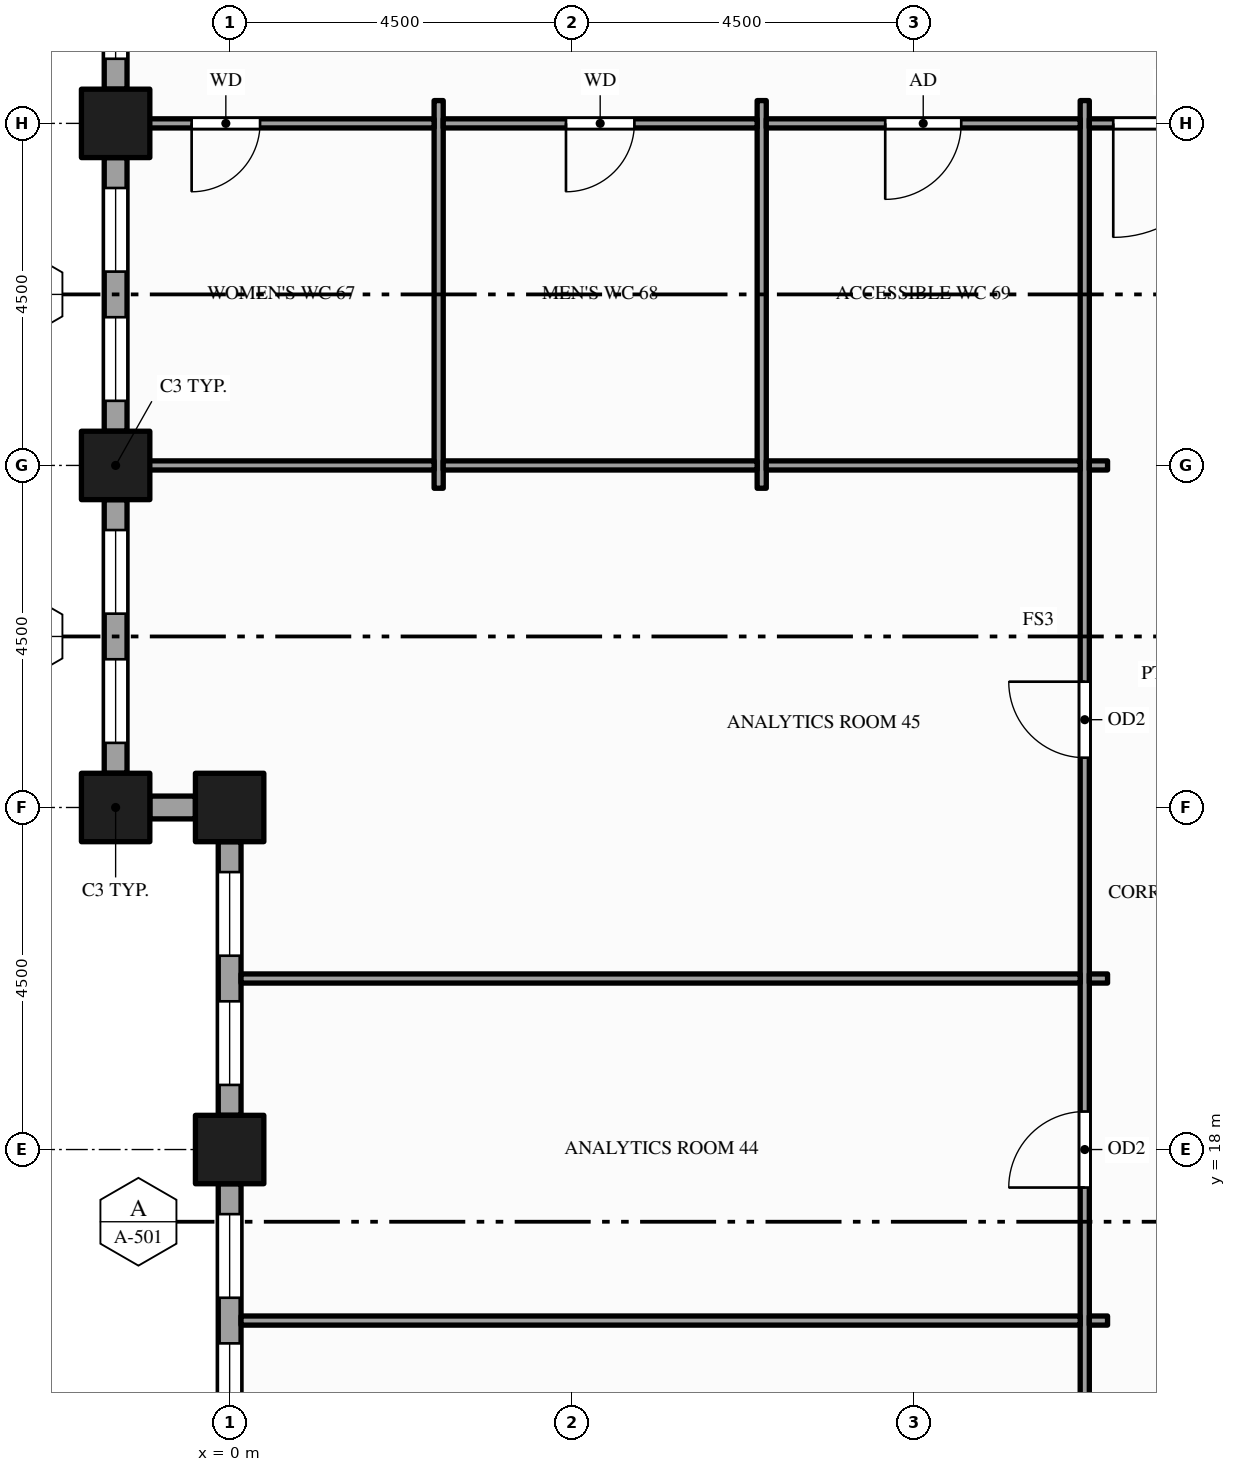
"""IFC4 building model, lengths in metres.
Left out: names, types, materials, properties, quantities, classifications, styles, units other than length and angle.
Written with IfcOpenShell. Run it as: python <this file> out.ifc"""

import sys

from ifc_helpers import new_model, si_unit, direction, frame, frame_2d, origin, origin_2d, place, context, subcontext, project, spatial, rectangle, hollow_rectangle, extrude, element, fill, save


model = new_model("IFC4")
c1 = context("Model", 3, precision=1e-05, world=origin(), true_north=direction((0.0, 1.0)))
c2 = subcontext(c1, "Body", "Model", "MODEL_VIEW")
j1 = project(units=[si_unit("LENGTHUNIT", "METRE"), si_unit("PLANEANGLEUNIT", "RADIAN")], contexts=[c1])
p1 = place(None, origin())
s1 = spatial("IfcSite", under=j1, at=p1, CompositionType="ELEMENT")
p2 = place(p1, origin())
s2 = spatial("IfcBuilding", under=s1, at=p2, CompositionType="ELEMENT")
p3 = place(p2, frame((0.0, 0.0, 183.0)))
s3 = spatial("IfcBuildingStorey", under=s2, at=p3, CompositionType="ELEMENT", Elevation=183.0)
for number, where, z_axis, x_axis in (
    (1, (-1.5, 22.5, -0.15), (0.0, 0.0, 1.0), (1.0, 0.0, 0.0)),
    (2, (-1.5, 27.0, -0.15), (0.0, 0.0, 1.0), (1.0, 0.0, 0.0)),
    (3, (-1.5, 31.5, -0.15), (0.0, 0.0, 1.0), (1.0, 0.0, 0.0)),
    (4, (0.0, 18.0, -0.15), (0.0, 0.0, 1.0), (1.0, 0.0, 0.0)),
    (5, (0.0, 22.5, -0.15), (0.0, 0.0, 1.0), (1.0, 0.0, 0.0)),
):
    element("IfcColumn", number, at=place(p3, frame(where, z_axis=z_axis, x_axis=x_axis)), inside=s3, PredefinedType="COLUMN", context=c2, shape_type="SweptSolid", body=[
        extrude(hollow_rectangle(XDim=0.9, YDim=0.9, WallThickness=0.045, at=origin_2d()), origin(), (0.0, 0.0, 1.0), 3.9),
    ])
p4 = place(p3, frame((-1.5, 35.55, 0.0), z_axis=(0.0, 0.0, 1.0), x_axis=(0.0, -1.0, 0.0)))
e6 = element("IfcWall", 6, at=p4, inside=s3, PredefinedType="STANDARD", context=c2, shape_type="SweptSolid", body=[
    extrude(rectangle(XDim=3.6, YDim=0.3, at=frame_2d((1.8, 0.0))), origin(), (0.0, 0.0, 1.0), 3.049),
])
p5 = place(p4, frame((0.4, 0.0, 0.9)))
e7 = element("IfcOpeningElement", 7, at=p5, cuts=e6, PredefinedType="OPENING", context=c2, shape_type="SweptSolid", body=[
    extrude(rectangle(XDim=1.1, YDim=2.0, at=frame_2d((0.55, 1.0))), frame((0.0, 0.16, 0.0), z_axis=(0.0, -1.0, 0.0), x_axis=(1.0, 0.0, 0.0)), (0.0, 0.0, 1.0), 0.32),
])
p6 = place(p4, frame((2.1, 0.0, 0.9)))
e8 = element("IfcOpeningElement", 8, at=p6, cuts=e6, PredefinedType="OPENING", context=c2, shape_type="SweptSolid", body=[
    extrude(rectangle(XDim=1.1, YDim=2.0, at=frame_2d((0.55, 1.0))), frame((0.0, 0.16, 0.0), z_axis=(0.0, -1.0, 0.0), x_axis=(1.0, 0.0, 0.0)), (0.0, 0.0, 1.0), 0.32),
])
p7 = place(p3, frame((-1.5, 31.05, 0.0), z_axis=(0.0, 0.0, 1.0), x_axis=(0.0, -1.0, 0.0)))
e9 = element("IfcWall", 9, at=p7, inside=s3, PredefinedType="STANDARD", context=c2, shape_type="SweptSolid", body=[
    extrude(rectangle(XDim=3.6, YDim=0.3, at=frame_2d((1.8, 0.0))), origin(), (0.0, 0.0, 1.0), 3.049),
])
p8 = place(p7, frame((0.4, 0.0, 0.9)))
e10 = element("IfcOpeningElement", 10, at=p8, cuts=e9, PredefinedType="OPENING", context=c2, shape_type="SweptSolid", body=[
    extrude(rectangle(XDim=1.1, YDim=2.0, at=frame_2d((0.55, 1.0))), frame((0.0, 0.16, 0.0), z_axis=(0.0, -1.0, 0.0), x_axis=(1.0, 0.0, 0.0)), (0.0, 0.0, 1.0), 0.32),
])
p9 = place(p7, frame((2.1, 0.0, 0.9)))
e11 = element("IfcOpeningElement", 11, at=p9, cuts=e9, PredefinedType="OPENING", context=c2, shape_type="SweptSolid", body=[
    extrude(rectangle(XDim=1.1, YDim=2.0, at=frame_2d((0.55, 1.0))), frame((0.0, 0.16, 0.0), z_axis=(0.0, -1.0, 0.0), x_axis=(1.0, 0.0, 0.0)), (0.0, 0.0, 1.0), 0.32),
])
p10 = place(p3, frame((-1.5, 26.55, 0.0), z_axis=(0.0, 0.0, 1.0), x_axis=(0.0, -1.0, 0.0)))
e12 = element("IfcWall", 12, at=p10, inside=s3, PredefinedType="STANDARD", context=c2, shape_type="SweptSolid", body=[
    extrude(rectangle(XDim=3.6, YDim=0.3, at=frame_2d((1.8, 0.0))), origin(), (0.0, 0.0, 1.0), 3.049),
])
p11 = place(p10, frame((0.4, 0.0, 0.9)))
e13 = element("IfcOpeningElement", 13, at=p11, cuts=e12, PredefinedType="OPENING", context=c2, shape_type="SweptSolid", body=[
    extrude(rectangle(XDim=1.1, YDim=2.0, at=frame_2d((0.55, 1.0))), frame((0.0, 0.16, 0.0), z_axis=(0.0, -1.0, 0.0), x_axis=(1.0, 0.0, 0.0)), (0.0, 0.0, 1.0), 0.32),
])
p12 = place(p10, frame((2.1, 0.0, 0.9)))
e14 = element("IfcOpeningElement", 14, at=p12, cuts=e12, PredefinedType="OPENING", context=c2, shape_type="SweptSolid", body=[
    extrude(rectangle(XDim=1.1, YDim=2.0, at=frame_2d((0.55, 1.0))), frame((0.0, 0.16, 0.0), z_axis=(0.0, -1.0, 0.0), x_axis=(1.0, 0.0, 0.0)), (0.0, 0.0, 1.0), 0.32),
])
p13 = place(p3, frame((-1.05, 22.5, 0.0), z_axis=(0.0, 0.0, 1.0), x_axis=(1.0, 0.0, 0.0)))
e15 = element("IfcWall", 15, at=p13, inside=s3, PredefinedType="STANDARD", context=c2, shape_type="SweptSolid", body=[
    extrude(rectangle(XDim=0.6, YDim=0.3, at=frame_2d((0.3, 0.0))), origin(), (0.0, 0.0, 1.0), 3.049),
])
p14 = place(p3, frame((0.0, 22.05, 0.0), z_axis=(0.0, 0.0, 1.0), x_axis=(0.0, -1.0, 0.0)))
e16 = element("IfcWall", 16, at=p14, inside=s3, PredefinedType="STANDARD", context=c2, shape_type="SweptSolid", body=[
    extrude(rectangle(XDim=3.6, YDim=0.3, at=frame_2d((1.8, 0.0))), origin(), (0.0, 0.0, 1.0), 3.049),
])
p15 = place(p14, frame((0.4, 0.0, 0.9)))
e17 = element("IfcOpeningElement", 17, at=p15, cuts=e16, PredefinedType="OPENING", context=c2, shape_type="SweptSolid", body=[
    extrude(rectangle(XDim=1.1, YDim=2.0, at=frame_2d((0.55, 1.0))), frame((0.0, 0.16, 0.0), z_axis=(0.0, -1.0, 0.0), x_axis=(1.0, 0.0, 0.0)), (0.0, 0.0, 1.0), 0.32),
])
p16 = place(p14, frame((2.1, 0.0, 0.9)))
e18 = element("IfcOpeningElement", 18, at=p16, cuts=e16, PredefinedType="OPENING", context=c2, shape_type="SweptSolid", body=[
    extrude(rectangle(XDim=1.1, YDim=2.0, at=frame_2d((0.55, 1.0))), frame((0.0, 0.16, 0.0), z_axis=(0.0, -1.0, 0.0), x_axis=(1.0, 0.0, 0.0)), (0.0, 0.0, 1.0), 0.32),
])
p17 = place(p3, frame((0.0, 17.55, 0.0), z_axis=(0.0, 0.0, 1.0), x_axis=(0.0, -1.0, 0.0)))
e19 = element("IfcWall", 19, at=p17, inside=s3, PredefinedType="STANDARD", context=c2, shape_type="SweptSolid", body=[
    extrude(rectangle(XDim=3.6, YDim=0.3, at=frame_2d((1.8, 0.0))), origin(), (0.0, 0.0, 1.0), 3.049),
])
p18 = place(p17, frame((0.4, 0.0, 0.9)))
e20 = element("IfcOpeningElement", 20, at=p18, cuts=e19, PredefinedType="OPENING", context=c2, shape_type="SweptSolid", body=[
    extrude(rectangle(XDim=1.1, YDim=2.0, at=frame_2d((0.55, 1.0))), frame((0.0, 0.16, 0.0), z_axis=(0.0, -1.0, 0.0), x_axis=(1.0, 0.0, 0.0)), (0.0, 0.0, 1.0), 0.32),
])
p19 = place(p17, frame((2.1, 0.0, 0.9)))
e21 = element("IfcOpeningElement", 21, at=p19, cuts=e19, PredefinedType="OPENING", context=c2, shape_type="SweptSolid", body=[
    extrude(rectangle(XDim=1.1, YDim=2.0, at=frame_2d((0.55, 1.0))), frame((0.0, 0.16, 0.0), z_axis=(0.0, -1.0, 0.0), x_axis=(1.0, 0.0, 0.0)), (0.0, 0.0, 1.0), 0.32),
])
for number, where, z_axis, x_axis in (
    (22, (2.75, 26.7, 0.0), (0.0, 0.0, 1.0), (0.0, 1.0, 0.0)),
    (23, (7.0, 26.7, 0.0), (0.0, 0.0, 1.0), (0.0, 1.0, 0.0)),
):
    element("IfcWall", number, at=place(p3, frame(where, z_axis=z_axis, x_axis=x_axis)), inside=s3, PredefinedType="PARTITIONING", context=c2, shape_type="SweptSolid", body=[
        extrude(rectangle(XDim=5.1, YDim=0.12, at=frame_2d((2.55, 0.0))), origin(), (0.0, 0.0, 1.0), 3.75),
    ])
p20 = place(p3, frame((11.25, 10.95, 0.0), z_axis=(0.0, 0.0, 1.0), x_axis=(0.0, 1.0, 0.0)))
e24 = element("IfcWall", 24, at=p20, inside=s3, PredefinedType="PARTITIONING", context=c2, shape_type="SweptSolid", body=[
    extrude(rectangle(XDim=20.85, YDim=0.12, at=frame_2d((10.425, 0.0))), origin(), (0.0, 0.0, 1.0), 2.5),
])
p21 = place(p20, frame((2.05, 0.0, 0.0)))
e25 = element("IfcOpeningElement", 25, at=p21, cuts=e24, PredefinedType="OPENING", context=c2, shape_type="SweptSolid", body=[
    extrude(rectangle(XDim=1.0, YDim=2.1, at=frame_2d((0.5, 1.05))), frame((0.0, 0.07, 0.0), z_axis=(0.0, -1.0, 0.0), x_axis=(1.0, 0.0, 0.0)), (0.0, 0.0, 1.0), 0.14),
])
p22 = place(p20, frame((6.55, 0.0, 0.0)))
e26 = element("IfcOpeningElement", 26, at=p22, cuts=e24, PredefinedType="OPENING", context=c2, shape_type="SweptSolid", body=[
    extrude(rectangle(XDim=1.0, YDim=2.1, at=frame_2d((0.5, 1.05))), frame((0.0, 0.07, 0.0), z_axis=(0.0, -1.0, 0.0), x_axis=(1.0, 0.0, 0.0)), (0.0, 0.0, 1.0), 0.14),
])
p23 = place(p20, frame((12.205, 0.0, 0.0)))
e27 = element("IfcOpeningElement", 27, at=p23, cuts=e24, PredefinedType="OPENING", context=c2, shape_type="SweptSolid", body=[
    extrude(rectangle(XDim=1.0, YDim=2.1, at=frame_2d((0.5, 1.05))), frame((0.0, 0.07, 0.0), z_axis=(0.0, -1.0, 0.0), x_axis=(1.0, 0.0, 0.0)), (0.0, 0.0, 1.0), 0.14),
])
p24 = place(p3, frame((0.15, 15.75, 0.0), z_axis=(0.0, 0.0, 1.0), x_axis=(1.0, 0.0, 0.0)))
e28 = element("IfcWall", 28, at=p24, inside=s3, PredefinedType="PARTITIONING", context=c2, shape_type="SweptSolid", body=[
    extrude(rectangle(XDim=11.04, YDim=0.12, at=frame_2d((5.52, 0.0))), origin(), (0.0, 0.0, 1.0), 2.77),
])
p25 = place(p3, frame((11.31, 15.75, 0.0), z_axis=(0.0, 0.0, 1.0), x_axis=(1.0, 0.0, 0.0)))
e29 = element("IfcWall", 29, at=p25, inside=s3, PredefinedType="PARTITIONING", context=c2, shape_type="SweptSolid", body=[
    extrude(rectangle(XDim=0.24, YDim=0.12, at=frame_2d((0.12, 0.0))), origin(), (0.0, 0.0, 1.0), 2.77),
])
p26 = place(p3, frame((0.15, 20.25, 0.0), z_axis=(0.0, 0.0, 1.0), x_axis=(1.0, 0.0, 0.0)))
e30 = element("IfcWall", 30, at=p26, inside=s3, PredefinedType="PARTITIONING", context=c2, shape_type="SweptSolid", body=[
    extrude(rectangle(XDim=11.04, YDim=0.12, at=frame_2d((5.52, 0.0))), origin(), (0.0, 0.0, 1.0), 2.77),
])
p27 = place(p3, frame((11.31, 20.25, 0.0), z_axis=(0.0, 0.0, 1.0), x_axis=(1.0, 0.0, 0.0)))
e31 = element("IfcWall", 31, at=p27, inside=s3, PredefinedType="PARTITIONING", context=c2, shape_type="SweptSolid", body=[
    extrude(rectangle(XDim=0.24, YDim=0.12, at=frame_2d((0.12, 0.0))), origin(), (0.0, 0.0, 1.0), 2.77),
])
p28 = place(p3, frame((-1.35, 27.0, 0.0), z_axis=(0.0, 0.0, 1.0), x_axis=(1.0, 0.0, 0.0)))
e32 = element("IfcWall", 32, at=p28, inside=s3, PredefinedType="PARTITIONING", context=c2, shape_type="SweptSolid", body=[
    extrude(rectangle(XDim=4.04, YDim=0.12, at=frame_2d((2.02, 0.0))), origin(), (0.0, 0.0, 1.0), 2.35),
])
for number, where, z_axis, x_axis in (
    (33, (2.81, 27.0, 0.0), (0.0, 0.0, 1.0), (1.0, 0.0, 0.0)),
    (34, (7.06, 27.0, 0.0), (0.0, 0.0, 1.0), (1.0, 0.0, 0.0)),
):
    element("IfcWall", number, at=place(p3, frame(where, z_axis=z_axis, x_axis=x_axis)), inside=s3, PredefinedType="PARTITIONING", context=c2, shape_type="SweptSolid", body=[
        extrude(rectangle(XDim=4.13, YDim=0.12, at=frame_2d((2.065, 0.0))), origin(), (0.0, 0.0, 1.0), 2.77),
    ])
p29 = place(p3, frame((11.31, 27.0, 0.0), z_axis=(0.0, 0.0, 1.0), x_axis=(1.0, 0.0, 0.0)))
e35 = element("IfcWall", 35, at=p29, inside=s3, PredefinedType="PARTITIONING", context=c2, shape_type="SweptSolid", body=[
    extrude(rectangle(XDim=0.24, YDim=0.12, at=frame_2d((0.12, 0.0))), origin(), (0.0, 0.0, 1.0), 2.77),
])
p30 = place(p3, frame((-1.35, 31.5, 0.0), z_axis=(0.0, 0.0, 1.0), x_axis=(1.0, 0.0, 0.0)))
e36 = element("IfcWall", 36, at=p30, inside=s3, PredefinedType="PARTITIONING", context=c2, shape_type="SweptSolid", body=[
    extrude(rectangle(XDim=4.04, YDim=0.12, at=frame_2d((2.02, 0.0))), origin(), (0.0, 0.0, 1.0), 2.35),
])
p31 = place(p30, frame((0.85, 0.0, 0.0)))
e37 = element("IfcOpeningElement", 37, at=p31, cuts=e36, PredefinedType="OPENING", context=c2, shape_type="SweptSolid", body=[
    extrude(rectangle(XDim=0.9, YDim=2.1, at=frame_2d((0.45, 1.05))), frame((0.0, 0.07, 0.0), z_axis=(0.0, -1.0, 0.0), x_axis=(1.0, 0.0, 0.0)), (0.0, 0.0, 1.0), 0.14),
])
p32 = place(p3, frame((2.81, 31.5, 0.0), z_axis=(0.0, 0.0, 1.0), x_axis=(1.0, 0.0, 0.0)))
e38 = element("IfcWall", 38, at=p32, inside=s3, PredefinedType="PARTITIONING", context=c2, shape_type="SweptSolid", body=[
    extrude(rectangle(XDim=4.13, YDim=0.12, at=frame_2d((2.065, 0.0))), origin(), (0.0, 0.0, 1.0), 2.77),
])
p33 = place(p32, frame((1.615, 0.0, 0.0)))
e39 = element("IfcOpeningElement", 39, at=p33, cuts=e38, PredefinedType="OPENING", context=c2, shape_type="SweptSolid", body=[
    extrude(rectangle(XDim=0.9, YDim=2.1, at=frame_2d((0.45, 1.05))), frame((0.0, 0.07, 0.0), z_axis=(0.0, -1.0, 0.0), x_axis=(1.0, 0.0, 0.0)), (0.0, 0.0, 1.0), 0.14),
])
p34 = place(p3, frame((7.06, 31.5, 0.0), z_axis=(0.0, 0.0, 1.0), x_axis=(1.0, 0.0, 0.0)))
e40 = element("IfcWall", 40, at=p34, inside=s3, PredefinedType="PARTITIONING", context=c2, shape_type="SweptSolid", body=[
    extrude(rectangle(XDim=4.13, YDim=0.12, at=frame_2d((2.065, 0.0))), origin(), (0.0, 0.0, 1.0), 2.77),
])
p35 = place(p34, frame((1.565, 0.0, 0.0)))
e41 = element("IfcOpeningElement", 41, at=p35, cuts=e40, PredefinedType="OPENING", context=c2, shape_type="SweptSolid", body=[
    extrude(rectangle(XDim=1.0, YDim=2.1, at=frame_2d((0.5, 1.05))), frame((0.0, 0.07, 0.0), z_axis=(0.0, -1.0, 0.0), x_axis=(1.0, 0.0, 0.0)), (0.0, 0.0, 1.0), 0.14),
])
p36 = place(p3, frame((11.31, 31.5, 0.0), z_axis=(0.0, 0.0, 1.0), x_axis=(1.0, 0.0, 0.0)))
e42 = element("IfcWall", 42, at=p36, inside=s3, PredefinedType="PARTITIONING", context=c2, shape_type="SweptSolid", body=[
    extrude(rectangle(XDim=2.13, YDim=0.12, at=frame_2d((1.065, 0.0))), origin(), (0.0, 0.0, 1.0), 2.77),
])
p37 = place(p36, frame((0.315, 0.0, 0.0)))
e43 = element("IfcOpeningElement", 43, at=p37, cuts=e42, PredefinedType="OPENING", context=c2, shape_type="SweptSolid", body=[
    extrude(rectangle(XDim=1.5, YDim=2.1, at=frame_2d((0.75, 1.05))), frame((0.0, 0.07, 0.0), z_axis=(0.0, -1.0, 0.0), x_axis=(1.0, 0.0, 0.0)), (0.0, 0.0, 1.0), 0.14),
])
p38 = place(p6, origin())
e44 = element("IfcWindow", 44, at=p38, inside=s3, PartitioningType="SINGLE_PANEL", PredefinedType="WINDOW", context=c2, shape_type="SweptSolid", body=[
    extrude(rectangle(XDim=1.1, YDim=2.0, at=frame_2d((0.55, 1.0))), frame((0.0, 0.03, 0.0), z_axis=(0.0, -1.0, 0.0), x_axis=(1.0, 0.0, 0.0)), (0.0, 0.0, 1.0), 0.06),
])
fill(e8, e44)
p39 = place(p8, origin())
e45 = element("IfcWindow", 45, at=p39, inside=s3, PartitioningType="SINGLE_PANEL", PredefinedType="WINDOW", context=c2, shape_type="SweptSolid", body=[
    extrude(rectangle(XDim=1.1, YDim=2.0, at=frame_2d((0.55, 1.0))), frame((0.0, 0.03, 0.0), z_axis=(0.0, -1.0, 0.0), x_axis=(1.0, 0.0, 0.0)), (0.0, 0.0, 1.0), 0.06),
])
fill(e10, e45)
p40 = place(p9, origin())
e46 = element("IfcWindow", 46, at=p40, inside=s3, PartitioningType="SINGLE_PANEL", PredefinedType="WINDOW", context=c2, shape_type="SweptSolid", body=[
    extrude(rectangle(XDim=1.1, YDim=2.0, at=frame_2d((0.55, 1.0))), frame((0.0, 0.03, 0.0), z_axis=(0.0, -1.0, 0.0), x_axis=(1.0, 0.0, 0.0)), (0.0, 0.0, 1.0), 0.06),
])
fill(e11, e46)
p41 = place(p11, origin())
e47 = element("IfcWindow", 47, at=p41, inside=s3, PartitioningType="SINGLE_PANEL", PredefinedType="WINDOW", context=c2, shape_type="SweptSolid", body=[
    extrude(rectangle(XDim=1.1, YDim=2.0, at=frame_2d((0.55, 1.0))), frame((0.0, 0.03, 0.0), z_axis=(0.0, -1.0, 0.0), x_axis=(1.0, 0.0, 0.0)), (0.0, 0.0, 1.0), 0.06),
])
fill(e13, e47)
p42 = place(p12, origin())
e48 = element("IfcWindow", 48, at=p42, inside=s3, PartitioningType="SINGLE_PANEL", PredefinedType="WINDOW", context=c2, shape_type="SweptSolid", body=[
    extrude(rectangle(XDim=1.1, YDim=2.0, at=frame_2d((0.55, 1.0))), frame((0.0, 0.03, 0.0), z_axis=(0.0, -1.0, 0.0), x_axis=(1.0, 0.0, 0.0)), (0.0, 0.0, 1.0), 0.06),
])
fill(e14, e48)
p43 = place(p15, origin())
e49 = element("IfcWindow", 49, at=p43, inside=s3, PartitioningType="SINGLE_PANEL", PredefinedType="WINDOW", context=c2, shape_type="SweptSolid", body=[
    extrude(rectangle(XDim=1.1, YDim=2.0, at=frame_2d((0.55, 1.0))), frame((0.0, 0.03, 0.0), z_axis=(0.0, -1.0, 0.0), x_axis=(1.0, 0.0, 0.0)), (0.0, 0.0, 1.0), 0.06),
])
fill(e17, e49)
p44 = place(p16, origin())
e50 = element("IfcWindow", 50, at=p44, inside=s3, PartitioningType="SINGLE_PANEL", PredefinedType="WINDOW", context=c2, shape_type="SweptSolid", body=[
    extrude(rectangle(XDim=1.1, YDim=2.0, at=frame_2d((0.55, 1.0))), frame((0.0, 0.03, 0.0), z_axis=(0.0, -1.0, 0.0), x_axis=(1.0, 0.0, 0.0)), (0.0, 0.0, 1.0), 0.06),
])
fill(e18, e50)
p45 = place(p18, origin())
e51 = element("IfcWindow", 51, at=p45, inside=s3, PartitioningType="SINGLE_PANEL", PredefinedType="WINDOW", context=c2, shape_type="SweptSolid", body=[
    extrude(rectangle(XDim=1.1, YDim=2.0, at=frame_2d((0.55, 1.0))), frame((0.0, 0.03, 0.0), z_axis=(0.0, -1.0, 0.0), x_axis=(1.0, 0.0, 0.0)), (0.0, 0.0, 1.0), 0.06),
])
fill(e20, e51)
p46 = place(p19, origin())
e52 = element("IfcWindow", 52, at=p46, inside=s3, PartitioningType="SINGLE_PANEL", PredefinedType="WINDOW", context=c2, shape_type="SweptSolid", body=[
    extrude(rectangle(XDim=1.1, YDim=2.0, at=frame_2d((0.55, 1.0))), frame((0.0, 0.03, 0.0), z_axis=(0.0, -1.0, 0.0), x_axis=(1.0, 0.0, 0.0)), (0.0, 0.0, 1.0), 0.06),
])
fill(e21, e52)
p47 = place(p37, origin())
e53 = element("IfcDoor", 53, at=p47, inside=s3, OperationType="SINGLE_SWING_LEFT", PredefinedType="DOOR", context=c2, shape_type="SweptSolid", body=[
    extrude(rectangle(XDim=1.5, YDim=2.1, at=frame_2d((0.75, 1.05))), frame((0.0, 0.025, 0.0), z_axis=(0.0, -1.0, 0.0), x_axis=(1.0, 0.0, 0.0)), (0.0, 0.0, 1.0), 0.05),
])
fill(e43, e53)
p48 = place(p22, origin())
e54 = element("IfcDoor", 54, at=p48, inside=s3, OperationType="SINGLE_SWING_LEFT", PredefinedType="DOOR", context=c2, shape_type="SweptSolid", body=[
    extrude(rectangle(XDim=1.0, YDim=2.1, at=frame_2d((0.5, 1.05))), frame((0.0, 0.025, 0.0), z_axis=(0.0, -1.0, 0.0), x_axis=(1.0, 0.0, 0.0)), (0.0, 0.0, 1.0), 0.05),
])
fill(e26, e54)
p49 = place(p23, origin())
e55 = element("IfcDoor", 55, at=p49, inside=s3, OperationType="SINGLE_SWING_RIGHT", PredefinedType="DOOR", context=c2, shape_type="SweptSolid", body=[
    extrude(rectangle(XDim=1.0, YDim=2.1, at=frame_2d((0.5, 1.05))), frame((0.0, 0.025, 0.0), z_axis=(0.0, -1.0, 0.0), x_axis=(1.0, 0.0, 0.0)), (0.0, 0.0, 1.0), 0.05),
])
fill(e27, e55)
p50 = place(p31, origin())
e56 = element("IfcDoor", 56, at=p50, inside=s3, OperationType="SINGLE_SWING_LEFT", PredefinedType="DOOR", context=c2, shape_type="SweptSolid", body=[
    extrude(rectangle(XDim=0.9, YDim=2.1, at=frame_2d((0.45, 1.05))), frame((0.0, 0.025, 0.0), z_axis=(0.0, -1.0, 0.0), x_axis=(1.0, 0.0, 0.0)), (0.0, 0.0, 1.0), 0.05),
])
fill(e37, e56)
p51 = place(p33, origin())
e57 = element("IfcDoor", 57, at=p51, inside=s3, OperationType="SINGLE_SWING_LEFT", PredefinedType="DOOR", context=c2, shape_type="SweptSolid", body=[
    extrude(rectangle(XDim=0.9, YDim=2.1, at=frame_2d((0.45, 1.05))), frame((0.0, 0.025, 0.0), z_axis=(0.0, -1.0, 0.0), x_axis=(1.0, 0.0, 0.0)), (0.0, 0.0, 1.0), 0.05),
])
fill(e39, e57)
p52 = place(p35, origin())
e58 = element("IfcDoor", 58, at=p52, inside=s3, OperationType="SINGLE_SWING_LEFT", PredefinedType="DOOR", context=c2, shape_type="SweptSolid", body=[
    extrude(rectangle(XDim=1.0, YDim=2.1, at=frame_2d((0.5, 1.05))), frame((0.0, 0.025, 0.0), z_axis=(0.0, -1.0, 0.0), x_axis=(1.0, 0.0, 0.0)), (0.0, 0.0, 1.0), 0.05),
])
fill(e41, e58)
save(model, sys.argv[1])
